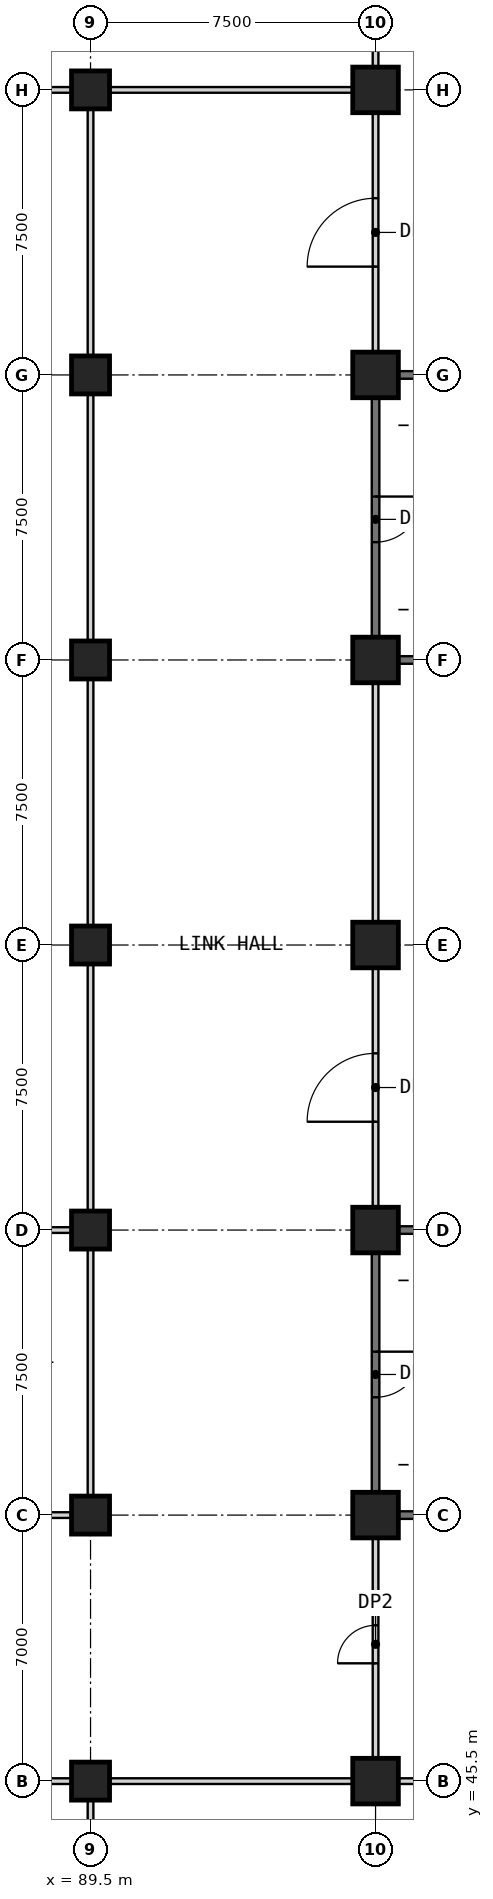
"""IFC4 building model, lengths in metres.
Left out: names, types, materials, properties, quantities, classifications, styles, units other than length and angle.
Written with IfcOpenShell. Run it as: python <this file> out.ifc"""

import sys

from ifc_helpers import new_model, si_unit, direction, frame, frame_2d, origin, origin_2d, place, context, subcontext, project, spatial, rectangle, extrude, element, fill, save


model = new_model("IFC4")
c1 = context("Model", 3, precision=1e-05, world=origin(), true_north=direction((0.0, 1.0)))
c2 = subcontext(c1, "Body", "Model", "MODEL_VIEW")
j1 = project(units=[si_unit("LENGTHUNIT", "METRE"), si_unit("PLANEANGLEUNIT", "RADIAN")], contexts=[c1])
p1 = place(None, origin())
s1 = spatial("IfcSite", under=j1, at=p1, CompositionType="ELEMENT")
p2 = place(p1, origin())
s2 = spatial("IfcBuilding", under=s1, at=p2, CompositionType="ELEMENT")
p3 = place(p2, frame((0.0, 0.0, 8.0)))
s3 = spatial("IfcBuildingStorey", under=s2, at=p3, CompositionType="ELEMENT", Elevation=8.0)
for number, where, z_axis, x_axis in (
    (1, (89.5, 45.5, 0.0), (0.0, 0.0, 1.0), (1.0, 0.0, 0.0)),
    (2, (89.5, 52.5, 0.0), (0.0, 0.0, 1.0), (1.0, 0.0, 0.0)),
    (3, (89.5, 60.0, 0.0), (0.0, 0.0, 1.0), (1.0, 0.0, 0.0)),
    (4, (89.5, 67.5, 0.0), (0.0, 0.0, 1.0), (1.0, 0.0, 0.0)),
    (5, (89.5, 75.0, 0.0), (0.0, 0.0, 1.0), (1.0, 0.0, 0.0)),
    (6, (89.5, 82.5, 0.0), (0.0, 0.0, 1.0), (1.0, 0.0, 0.0)),
    (7, (89.5, 90.0, 0.0), (0.0, 0.0, 1.0), (1.0, 0.0, 0.0)),
):
    element("IfcColumn", number, at=place(p3, frame(where, z_axis=z_axis, x_axis=x_axis)), inside=s3, PredefinedType="COLUMN", context=c2, shape_type="SweptSolid", body=[
        extrude(rectangle(XDim=1.0, YDim=1.0, at=origin_2d()), origin(), (0.0, 0.0, 1.0), 5.5),
    ])
for number, where, z_axis, x_axis in (
    (8, (97.0, 45.5, 0.0), (0.0, 0.0, 1.0), (1.0, 0.0, 0.0)),
    (9, (97.0, 52.5, 0.0), (0.0, 0.0, 1.0), (1.0, 0.0, 0.0)),
    (10, (97.0, 60.0, 0.0), (0.0, 0.0, 1.0), (1.0, 0.0, 0.0)),
    (11, (97.0, 67.5, 0.0), (0.0, 0.0, 1.0), (1.0, 0.0, 0.0)),
    (12, (97.0, 75.0, 0.0), (0.0, 0.0, 1.0), (1.0, 0.0, 0.0)),
    (13, (97.0, 82.5, 0.0), (0.0, 0.0, 1.0), (1.0, 0.0, 0.0)),
    (14, (97.0, 90.0, 0.0), (0.0, 0.0, 1.0), (1.0, 0.0, 0.0)),
):
    element("IfcColumn", number, at=place(p3, frame(where, z_axis=z_axis, x_axis=x_axis)), inside=s3, PredefinedType="COLUMN", context=c2, shape_type="SweptSolid", body=[
        extrude(rectangle(XDim=1.2, YDim=1.2, at=origin_2d()), origin(), (0.0, 0.0, 1.0), 5.5),
    ])
for number, where, z_axis, x_axis in (
    (15, (82.6, 45.5, 0.0), (0.0, 0.0, 1.0), (1.0, 0.0, 0.0)),
    (16, (90.0, 45.5, 0.0), (0.0, 0.0, 1.0), (1.0, 0.0, 0.0)),
):
    element("IfcWall", number, at=place(p3, frame(where, z_axis=z_axis, x_axis=x_axis)), inside=s3, PredefinedType="PARTITIONING", context=c2, shape_type="SweptSolid", body=[
        extrude(rectangle(XDim=6.4, YDim=0.15, at=frame_2d((3.2, 0.0))), origin(), (0.0, 0.0, 1.0), 5.2),
    ])
p4 = place(p3, frame((97.6, 45.5, 0.0), z_axis=(0.0, 0.0, 1.0), x_axis=(1.0, 0.0, 0.0)))
e17 = element("IfcWall", 17, at=p4, inside=s3, PredefinedType="PARTITIONING", context=c2, shape_type="SweptSolid", body=[
    extrude(rectangle(XDim=6.3, YDim=0.15, at=frame_2d((3.15, 0.0))), origin(), (0.0, 0.0, 1.0), 5.2),
])
p5 = place(p4, frame((2.25, 0.0, 0.0)))
e18 = element("IfcOpeningElement", 18, at=p5, cuts=e17, PredefinedType="OPENING", context=c2, shape_type="SweptSolid", body=[
    extrude(rectangle(XDim=1.8, YDim=2.4, at=frame_2d((0.9, 1.2))), frame((0.0, 0.085, 0.0), z_axis=(0.0, -1.0, 0.0), x_axis=(1.0, 0.0, 0.0)), (0.0, 0.0, 1.0), 0.17),
])
p6 = place(p3, frame((89.0, 52.5, 0.0), z_axis=(0.0, 0.0, 1.0), x_axis=(-1.0, 0.0, 0.0)))
e19 = element("IfcWall", 19, at=p6, inside=s3, PredefinedType="PARTITIONING", context=c2, shape_type="SweptSolid", body=[
    extrude(rectangle(XDim=3.175, YDim=0.15, at=frame_2d((1.587, 0.0))), origin(), (0.0, 0.0, 1.0), 5.2),
])
p7 = place(p6, frame((0.625, 0.0, 0.0)))
e20 = element("IfcOpeningElement", 20, at=p7, cuts=e19, PredefinedType="OPENING", context=c2, shape_type="SweptSolid", body=[
    extrude(rectangle(XDim=1.8, YDim=2.4, at=frame_2d((0.9, 1.2))), frame((0.0, 0.085, 0.0), z_axis=(0.0, -1.0, 0.0), x_axis=(1.0, 0.0, 0.0)), (0.0, 0.0, 1.0), 0.17),
])
p8 = place(p3, frame((97.6, 52.5, 0.0), z_axis=(0.0, 0.0, 1.0), x_axis=(1.0, 0.0, 0.0)))
e21 = element("IfcWall", 21, at=p8, inside=s3, PredefinedType="SHEAR", context=c2, shape_type="SweptSolid", body=[
    extrude(rectangle(XDim=6.3, YDim=0.2, at=frame_2d((3.15, 0.0))), origin(), (0.0, 0.0, 1.0), 5.2),
])
p9 = place(p3, frame((85.825, 60.0, 0.0), z_axis=(0.0, 0.0, 1.0), x_axis=(1.0, 0.0, 0.0)))
e22 = element("IfcWall", 22, at=p9, inside=s3, PredefinedType="PARTITIONING", context=c2, shape_type="SweptSolid", body=[
    extrude(rectangle(XDim=3.175, YDim=0.15, at=frame_2d((1.587, 0.0))), origin(), (0.0, 0.0, 1.0), 5.2),
])
for number, where, z_axis, x_axis in (
    (23, (97.6, 60.0, 0.0), (0.0, 0.0, 1.0), (1.0, 0.0, 0.0)),
    (24, (97.6, 75.0, 0.0), (0.0, 0.0, 1.0), (1.0, 0.0, 0.0)),
    (25, (97.6, 82.5, 0.0), (0.0, 0.0, 1.0), (1.0, 0.0, 0.0)),
):
    element("IfcWall", number, at=place(p3, frame(where, z_axis=z_axis, x_axis=x_axis)), inside=s3, PredefinedType="SHEAR", context=c2, shape_type="SweptSolid", body=[
        extrude(rectangle(XDim=6.3, YDim=0.2, at=frame_2d((3.15, 0.0))), origin(), (0.0, 0.0, 1.0), 5.2),
    ])
for number, where, z_axis, x_axis in (
    (26, (82.6, 90.0, 0.0), (0.0, 0.0, 1.0), (1.0, 0.0, 0.0)),
    (27, (90.0, 90.0, 0.0), (0.0, 0.0, 1.0), (1.0, 0.0, 0.0)),
):
    element("IfcWall", number, at=place(p3, frame(where, z_axis=z_axis, x_axis=x_axis)), inside=s3, PredefinedType="PARTITIONING", context=c2, shape_type="SweptSolid", body=[
        extrude(rectangle(XDim=6.4, YDim=0.15, at=frame_2d((3.2, 0.0))), origin(), (0.0, 0.0, 1.0), 5.2),
    ])
p10 = place(p3, frame((97.0, 46.1, 0.0), z_axis=(0.0, 0.0, 1.0), x_axis=(0.0, 1.0, 0.0)))
e28 = element("IfcWall", 28, at=p10, inside=s3, PredefinedType="PARTITIONING", context=c2, shape_type="SweptSolid", body=[
    extrude(rectangle(XDim=5.8, YDim=0.15, at=frame_2d((2.9, 0.0))), origin(), (0.0, 0.0, 1.0), 5.2),
])
p11 = place(p10, frame((2.5, 0.0, 0.0)))
e29 = element("IfcOpeningElement", 29, at=p11, cuts=e28, PredefinedType="OPENING", context=c2, shape_type="SweptSolid", body=[
    extrude(rectangle(XDim=1.0, YDim=2.1, at=frame_2d((0.5, 1.05))), frame((0.0, 0.085, 0.0), z_axis=(0.0, -1.0, 0.0), x_axis=(1.0, 0.0, 0.0)), (0.0, 0.0, 1.0), 0.17),
])
p12 = place(p3, frame((97.0, 59.4, 0.0), z_axis=(0.0, 0.0, 1.0), x_axis=(0.0, -1.0, 0.0)))
e30 = element("IfcWall", 30, at=p12, inside=s3, PredefinedType="SHEAR", context=c2, shape_type="SweptSolid", body=[
    extrude(rectangle(XDim=6.3, YDim=0.2, at=frame_2d((3.15, 0.0))), origin(), (0.0, 0.0, 1.0), 5.2),
])
p13 = place(p12, frame((2.6, 0.0, 0.0)))
e31 = element("IfcOpeningElement", 31, at=p13, cuts=e30, PredefinedType="OPENING", context=c2, shape_type="SweptSolid", body=[
    extrude(rectangle(XDim=1.2, YDim=2.1, at=frame_2d((0.6, 1.05))), frame((0.0, 0.11, 0.0), z_axis=(0.0, -1.0, 0.0), x_axis=(1.0, 0.0, 0.0)), (0.0, 0.0, 1.0), 0.22),
])
p14 = place(p3, frame((97.0, 60.6, 0.0), z_axis=(0.0, 0.0, 1.0), x_axis=(0.0, 1.0, 0.0)))
e32 = element("IfcWall", 32, at=p14, inside=s3, PredefinedType="PARTITIONING", context=c2, shape_type="SweptSolid", body=[
    extrude(rectangle(XDim=6.3, YDim=0.15, at=frame_2d((3.15, 0.0))), origin(), (0.0, 0.0, 1.0), 5.2),
])
p15 = place(p14, frame((2.25, 0.0, 0.0)))
e33 = element("IfcOpeningElement", 33, at=p15, cuts=e32, PredefinedType="OPENING", context=c2, shape_type="SweptSolid", body=[
    extrude(rectangle(XDim=1.8, YDim=2.4, at=frame_2d((0.9, 1.2))), frame((0.0, 0.085, 0.0), z_axis=(0.0, -1.0, 0.0), x_axis=(1.0, 0.0, 0.0)), (0.0, 0.0, 1.0), 0.17),
])
p16 = place(p3, frame((97.0, 68.1, 0.0), z_axis=(0.0, 0.0, 1.0), x_axis=(0.0, 1.0, 0.0)))
e34 = element("IfcWall", 34, at=p16, inside=s3, PredefinedType="PARTITIONING", context=c2, shape_type="SweptSolid", body=[
    extrude(rectangle(XDim=6.3, YDim=0.15, at=frame_2d((3.15, 0.0))), origin(), (0.0, 0.0, 1.0), 5.2),
])
p17 = place(p3, frame((97.0, 81.9, 0.0), z_axis=(0.0, 0.0, 1.0), x_axis=(0.0, -1.0, 0.0)))
e35 = element("IfcWall", 35, at=p17, inside=s3, PredefinedType="SHEAR", context=c2, shape_type="SweptSolid", body=[
    extrude(rectangle(XDim=6.3, YDim=0.2, at=frame_2d((3.15, 0.0))), origin(), (0.0, 0.0, 1.0), 5.2),
])
p18 = place(p17, frame((2.6, 0.0, 0.0)))
e36 = element("IfcOpeningElement", 36, at=p18, cuts=e35, PredefinedType="OPENING", context=c2, shape_type="SweptSolid", body=[
    extrude(rectangle(XDim=1.2, YDim=2.1, at=frame_2d((0.6, 1.05))), frame((0.0, 0.11, 0.0), z_axis=(0.0, -1.0, 0.0), x_axis=(1.0, 0.0, 0.0)), (0.0, 0.0, 1.0), 0.22),
])
p19 = place(p3, frame((97.0, 83.1, 0.0), z_axis=(0.0, 0.0, 1.0), x_axis=(0.0, 1.0, 0.0)))
e37 = element("IfcWall", 37, at=p19, inside=s3, PredefinedType="PARTITIONING", context=c2, shape_type="SweptSolid", body=[
    extrude(rectangle(XDim=6.3, YDim=0.15, at=frame_2d((3.15, 0.0))), origin(), (0.0, 0.0, 1.0), 5.2),
])
p20 = place(p19, frame((2.25, 0.0, 0.0)))
e38 = element("IfcOpeningElement", 38, at=p20, cuts=e37, PredefinedType="OPENING", context=c2, shape_type="SweptSolid", body=[
    extrude(rectangle(XDim=1.8, YDim=2.4, at=frame_2d((0.9, 1.2))), frame((0.0, 0.085, 0.0), z_axis=(0.0, -1.0, 0.0), x_axis=(1.0, 0.0, 0.0)), (0.0, 0.0, 1.0), 0.17),
])
p21 = place(p3, frame((97.0, 90.6, 0.0), z_axis=(0.0, 0.0, 1.0), x_axis=(0.0, 1.0, 0.0)))
e39 = element("IfcWall", 39, at=p21, inside=s3, PredefinedType="PARTITIONING", context=c2, shape_type="SweptSolid", body=[
    extrude(rectangle(XDim=5.8, YDim=0.15, at=frame_2d((2.9, 0.0))), origin(), (0.0, 0.0, 1.0), 5.2),
])
p22 = place(p3, frame((89.5, 38.6, 0.0), z_axis=(0.0, 0.0, 1.0), x_axis=(0.0, 1.0, 0.0)))
e40 = element("IfcWall", 40, at=p22, inside=s3, PredefinedType="PARTITIONING", context=c2, shape_type="SweptSolid", body=[
    extrude(rectangle(XDim=6.4, YDim=0.15, at=frame_2d((3.2, 0.0))), origin(), (0.0, 0.0, 1.0), 5.2),
])
for number, where, z_axis, x_axis in (
    (41, (89.5, 53.0, 0.0), (0.0, 0.0, 1.0), (0.0, 1.0, 0.0)),
    (42, (89.5, 60.5, 0.0), (0.0, 0.0, 1.0), (0.0, 1.0, 0.0)),
    (43, (89.5, 68.0, 0.0), (0.0, 0.0, 1.0), (0.0, 1.0, 0.0)),
    (44, (89.5, 75.5, 0.0), (0.0, 0.0, 1.0), (0.0, 1.0, 0.0)),
    (45, (89.5, 83.0, 0.0), (0.0, 0.0, 1.0), (0.0, 1.0, 0.0)),
):
    element("IfcWall", number, at=place(p3, frame(where, z_axis=z_axis, x_axis=x_axis)), inside=s3, PredefinedType="PARTITIONING", context=c2, shape_type="SweptSolid", body=[
        extrude(rectangle(XDim=6.5, YDim=0.15, at=frame_2d((3.25, 0.0))), origin(), (0.0, 0.0, 1.0), 5.2),
    ])
p23 = place(p11, origin())
e46 = element("IfcDoor", 46, at=p23, inside=s3, OperationType="SINGLE_SWING_LEFT", PredefinedType="DOOR", context=c2, shape_type="SweptSolid", body=[
    extrude(rectangle(XDim=1.0, YDim=2.1, at=frame_2d((0.5, 1.05))), frame((0.0, 0.025, 0.0), z_axis=(0.0, -1.0, 0.0), x_axis=(1.0, 0.0, 0.0)), (0.0, 0.0, 1.0), 0.05),
])
fill(e29, e46)
p24 = place(p13, origin())
e47 = element("IfcDoor", 47, at=p24, inside=s3, OperationType="SINGLE_SWING_LEFT", PredefinedType="DOOR", context=c2, shape_type="SweptSolid", body=[
    extrude(rectangle(XDim=1.2, YDim=2.1, at=frame_2d((0.6, 1.05))), frame((0.0, 0.025, 0.0), z_axis=(0.0, -1.0, 0.0), x_axis=(1.0, 0.0, 0.0)), (0.0, 0.0, 1.0), 0.05),
])
fill(e31, e47)
p25 = place(p15, origin())
e48 = element("IfcDoor", 48, at=p25, inside=s3, OperationType="SINGLE_SWING_LEFT", PredefinedType="DOOR", context=c2, shape_type="SweptSolid", body=[
    extrude(rectangle(XDim=1.8, YDim=2.4, at=frame_2d((0.9, 1.2))), frame((0.0, 0.025, 0.0), z_axis=(0.0, -1.0, 0.0), x_axis=(1.0, 0.0, 0.0)), (0.0, 0.0, 1.0), 0.05),
])
fill(e33, e48)
p26 = place(p18, origin())
e49 = element("IfcDoor", 49, at=p26, inside=s3, OperationType="SINGLE_SWING_LEFT", PredefinedType="DOOR", context=c2, shape_type="SweptSolid", body=[
    extrude(rectangle(XDim=1.2, YDim=2.1, at=frame_2d((0.6, 1.05))), frame((0.0, 0.025, 0.0), z_axis=(0.0, -1.0, 0.0), x_axis=(1.0, 0.0, 0.0)), (0.0, 0.0, 1.0), 0.05),
])
fill(e36, e49)
p27 = place(p20, origin())
e50 = element("IfcDoor", 50, at=p27, inside=s3, OperationType="SINGLE_SWING_LEFT", PredefinedType="DOOR", context=c2, shape_type="SweptSolid", body=[
    extrude(rectangle(XDim=1.8, YDim=2.4, at=frame_2d((0.9, 1.2))), frame((0.0, 0.025, 0.0), z_axis=(0.0, -1.0, 0.0), x_axis=(1.0, 0.0, 0.0)), (0.0, 0.0, 1.0), 0.05),
])
fill(e38, e50)
save(model, sys.argv[1])
